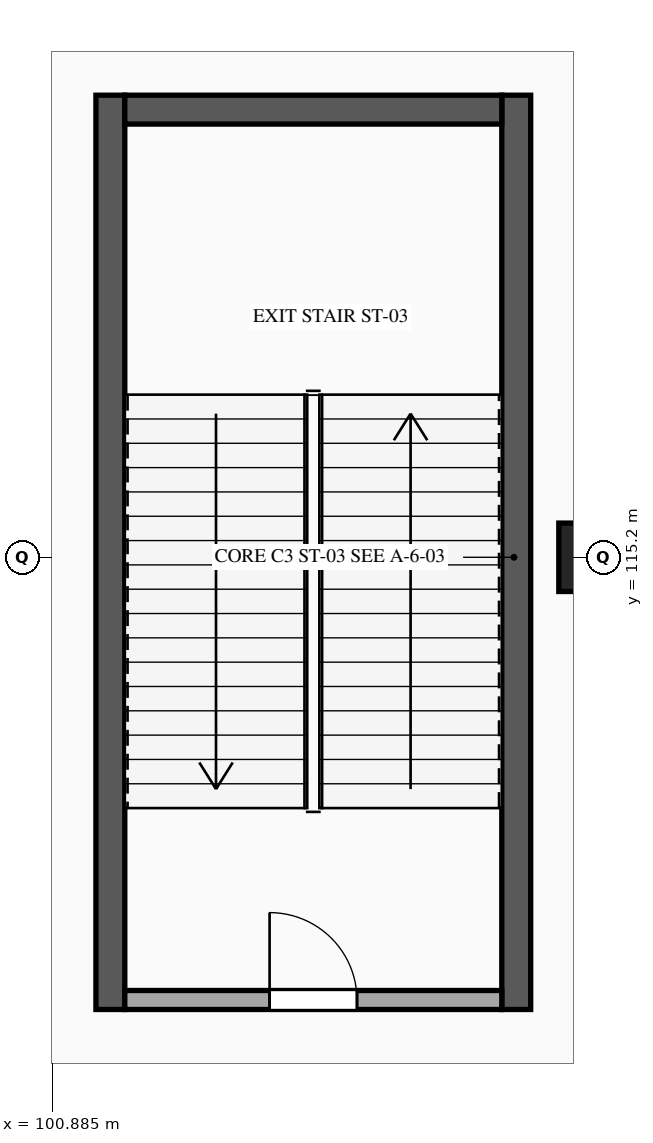
"""IFC4 building model, lengths in metres.
Left out: names, types, materials, properties, quantities, classifications, styles, units other than length and angle.
Written with IfcOpenShell. Run it as: python <this file> out.ifc"""

import sys

from ifc_helpers import new_model, si_unit, direction, frame, frame_2d, origin, origin_2d, place, context, subcontext, project, spatial, rectangle, extrude, element, fill, save


model = new_model("IFC4")
c1 = context("Model", 3, precision=1e-05, world=origin(), true_north=direction((0.0, 1.0)))
c2 = subcontext(c1, "Body", "Model", "MODEL_VIEW")
j1 = project(units=[si_unit("LENGTHUNIT", "METRE"), si_unit("PLANEANGLEUNIT", "RADIAN")], contexts=[c1])
p1 = place(None, origin())
s1 = spatial("IfcSite", under=j1, at=p1, CompositionType="ELEMENT")
p2 = place(p1, origin())
s2 = spatial("IfcBuilding", under=s1, at=p2, CompositionType="ELEMENT")
p3 = place(p2, frame((0.0, 0.0, -5.4)))
s3 = spatial("IfcBuildingStorey", under=s2, at=p3, CompositionType="ELEMENT", Elevation=-5.4)
p4 = place(p3, frame((108.0, 115.2, 0.0), z_axis=(0.0, 0.0, 1.0), x_axis=(1.0, 0.0, 0.0)))
e1 = element("IfcColumn", 1, at=p4, inside=s3, PredefinedType="COLUMN", context=c2, shape_type="SweptSolid", body=[
    extrude(rectangle(XDim=0.9, YDim=0.9, at=origin_2d()), origin(), (0.0, 0.0, 1.0), 5.4),
])
for number, where, z_axis, x_axis in (
    (2, (101.65, 109.25, 0.0), (0.0, 0.0, 1.0), (0.0, 1.0, 0.0)),
    (3, (106.99, 121.28, 0.0), (0.0, 0.0, 1.0), (0.0, -1.0, 0.0)),
):
    element("IfcWall", number, at=place(p3, frame(where, z_axis=z_axis, x_axis=x_axis)), inside=s3, PredefinedType="SHEAR", context=c2, shape_type="SweptSolid", body=[
        extrude(rectangle(XDim=12.03, YDim=0.38, at=frame_2d((6.015, 0.0))), origin(), (0.0, 0.0, 1.0), 5.08),
    ])
p5 = place(p3, frame((101.84, 121.09, 0.0), z_axis=(0.0, 0.0, 1.0), x_axis=(1.0, 0.0, 0.0)))
e4 = element("IfcWall", 4, at=p5, inside=s3, PredefinedType="SHEAR", context=c2, shape_type="SweptSolid", body=[
    extrude(rectangle(XDim=4.96, YDim=0.38, at=frame_2d((2.48, 0.0))), origin(), (0.0, 0.0, 1.0), 5.08),
])
p6 = place(p3, frame((101.84, 109.375, 0.0), z_axis=(0.0, 0.0, 1.0), x_axis=(1.0, 0.0, 0.0)))
e5 = element("IfcWall", 5, at=p6, inside=s3, PredefinedType="STANDARD", context=c2, shape_type="SweptSolid", body=[
    extrude(rectangle(XDim=4.96, YDim=0.25, at=frame_2d((2.48, 0.0))), origin(), (0.0, 0.0, 1.0), 4.95),
])
p7 = place(p6, frame((1.905, 0.0, 0.0)))
e6 = element("IfcOpeningElement", 6, at=p7, cuts=e5, PredefinedType="OPENING", context=c2, shape_type="SweptSolid", body=[
    extrude(rectangle(XDim=1.15, YDim=2.2, at=frame_2d((0.575, 1.1))), frame((0.0, 0.135, 0.0), z_axis=(0.0, -1.0, 0.0), x_axis=(1.0, 0.0, 0.0)), (0.0, 0.0, 1.0), 0.27),
])
p8 = place(p7, origin())
e7 = element("IfcDoor", 7, at=p8, inside=s3, OperationType="SINGLE_SWING_LEFT", PredefinedType="DOOR", context=c2, shape_type="SweptSolid", body=[
    extrude(rectangle(XDim=1.15, YDim=2.2, at=frame_2d((0.575, 1.1))), frame((0.0, 0.025, 0.0), z_axis=(0.0, -1.0, 0.0), x_axis=(1.0, 0.0, 0.0)), (0.0, 0.0, 1.0), 0.05),
])
fill(e6, e7)
save(model, sys.argv[1])
